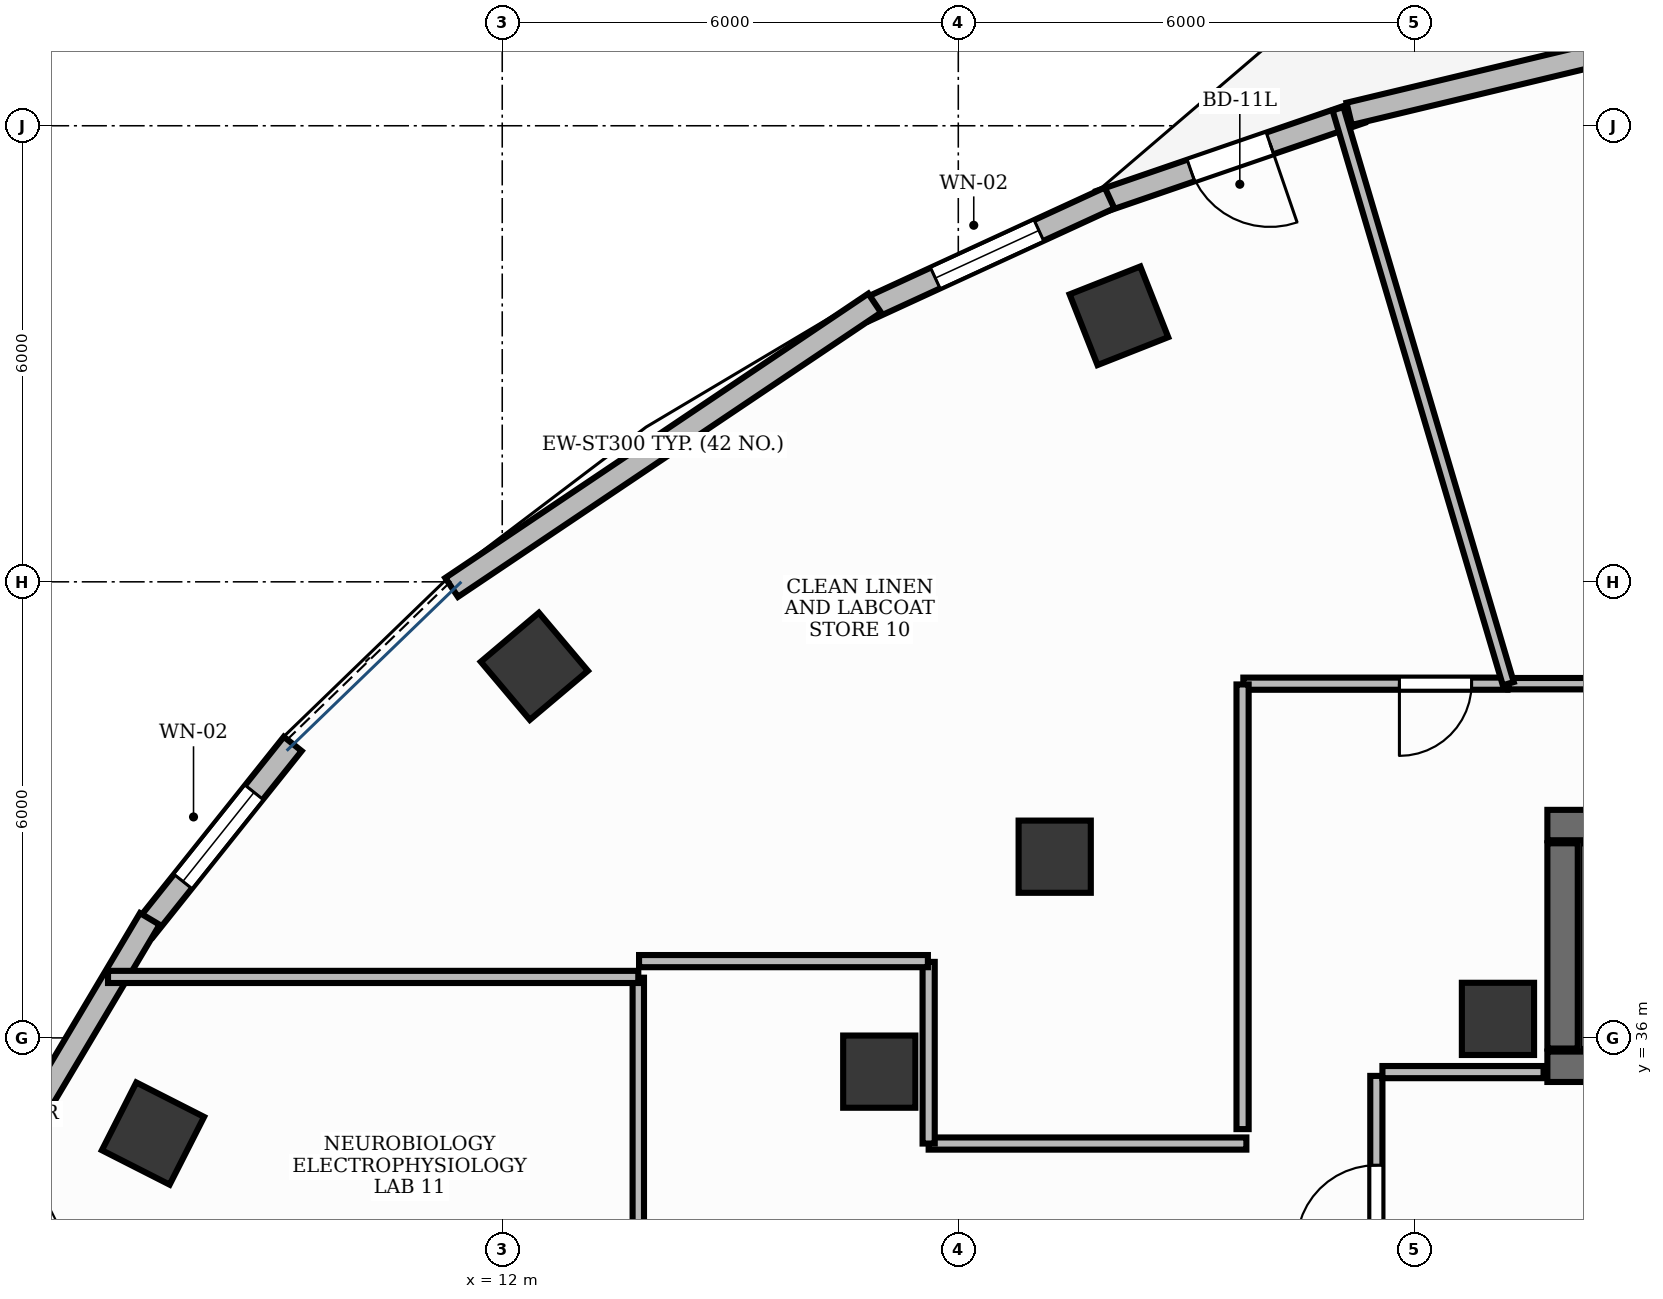
"""IFC4 building model, lengths in metres.
Left out: names, types, materials, properties, quantities, classifications, styles, units other than length and angle.
Written with IfcOpenShell. Run it as: python <this file> out.ifc"""

import sys

from ifc_helpers import new_model, si_unit, direction, frame, frame_2d, origin, origin_2d, place, context, subcontext, project, spatial, rectangle, extrude, element, fill, save


model = new_model("IFC4")
c1 = context("Model", 3, precision=1e-05, world=origin(), true_north=direction((0.0, 1.0)))
c2 = subcontext(c1, "Body", "Model", "MODEL_VIEW")
j1 = project(units=[si_unit("LENGTHUNIT", "METRE"), si_unit("PLANEANGLEUNIT", "RADIAN")], contexts=[c1])
p1 = place(None, origin())
s1 = spatial("IfcSite", under=j1, at=p1, CompositionType="ELEMENT")
p2 = place(p1, origin())
s2 = spatial("IfcBuilding", under=s1, at=p2, CompositionType="ELEMENT")
p3 = place(p2, frame((0.0, 0.0, 222.6)))
s3 = spatial("IfcBuildingStorey", under=s2, at=p3, CompositionType="ELEMENT", Elevation=222.6)
p4 = place(p3, frame((25.75, 38.8, 0.0), z_axis=(0.0, 0.0, 1.0), x_axis=(1.0, 0.0, 0.0)))
e1 = element("IfcWall", 1, at=p4, inside=s3, PredefinedType="SHEAR", context=c2, shape_type="SweptSolid", body=[
    extrude(rectangle(XDim=3.1, YDim=0.4, at=frame_2d((1.55, 0.0))), origin(), (0.0, 0.0, 1.0), 3.9),
])
p5 = place(p3, frame((25.75, 35.62, 0.0), z_axis=(0.0, 0.0, 1.0), x_axis=(1.0, 0.0, 0.0)))
e2 = element("IfcWall", 2, at=p5, inside=s3, PredefinedType="SHEAR", context=c2, shape_type="SweptSolid", body=[
    extrude(rectangle(XDim=3.1, YDim=0.4, at=frame_2d((1.55, 0.0))), origin(), (0.0, 0.0, 1.0), 3.9),
])
p6 = place(p5, frame((0.9, 0.0, 0.0)))
e3 = element("IfcOpeningElement", 3, at=p6, cuts=e2, PredefinedType="OPENING", context=c2, shape_type="SweptSolid", body=[
    extrude(rectangle(XDim=1.3, YDim=2.2, at=frame_2d((0.65, 1.1))), frame((0.0, 0.215, 0.0), z_axis=(0.0, -1.0, 0.0), x_axis=(1.0, 0.0, 0.0)), (0.0, 0.0, 1.0), 0.43),
])
p7 = place(p3, frame((25.95, 35.86, 0.0), z_axis=(0.0, 0.0, 1.0), x_axis=(0.0, 1.0, 0.0)))
e4 = element("IfcWall", 4, at=p7, inside=s3, PredefinedType="SHEAR", context=c2, shape_type="SweptSolid", body=[
    extrude(rectangle(XDim=2.7, YDim=0.4, at=frame_2d((1.35, 0.0))), origin(), (0.0, 0.0, 1.0), 3.9),
])
p8 = place(p3, frame((25.1, 36.25, -0.0), z_axis=(0.0, 0.0, 1.0), x_axis=(1.0, 0.0, 0.0)))
e5 = element("IfcColumn", 5, at=p8, inside=s3, PredefinedType="PILASTER", context=c2, shape_type="SweptSolid", body=[
    extrude(rectangle(XDim=0.95, YDim=0.95, at=origin_2d()), origin(), (0.0, 0.0, 1.0), 3.901),
])
for number, where, z_axis, x_axis in (
    (6, (20.113, 45.5, -0.0), (0.0, 0.0, 1.0), (0.93, 0.367, 0.0)),
    (7, (12.423, 40.889, -0.0), (0.0, 0.0, 1.0), (0.764, 0.645, 0.0)),
):
    element("IfcColumn", number, at=place(p3, frame(where, z_axis=z_axis, x_axis=x_axis)), inside=s3, PredefinedType="COLUMN", context=c2, shape_type="SweptSolid", body=[
        extrude(rectangle(XDim=1.0, YDim=1.0, at=origin_2d()), origin(), (0.0, 0.0, 1.0), 3.901),
    ])
p9 = place(p3, frame((19.268, 38.384, -0.0), z_axis=(0.0, 0.0, 1.0), x_axis=(1.0, 0.0, 0.0)))
e8 = element("IfcColumn", 8, at=p9, inside=s3, PredefinedType="COLUMN", context=c2, shape_type="SweptSolid", body=[
    extrude(rectangle(XDim=0.95, YDim=0.95, at=origin_2d()), origin(), (0.0, 0.0, 1.0), 3.901),
])
p10 = place(p3, frame((7.405, 34.741, -0.0), z_axis=(0.0, 0.0, 1.0), x_axis=(0.453057191132, 0.891481453292, 0.0)))
e9 = element("IfcColumn", 9, at=p10, inside=s3, PredefinedType="COLUMN", context=c2, shape_type="SweptSolid", body=[
    extrude(rectangle(XDim=1.0, YDim=1.0, at=origin_2d()), origin(), (0.0, 0.0, 1.0), 3.901),
])
p11 = place(p3, frame((16.96, 35.556, -0.0), z_axis=(0.0, 0.0, 1.0), x_axis=(1.0, 0.0, 0.0)))
e10 = element("IfcColumn", 10, at=p11, inside=s3, PredefinedType="COLUMN", context=c2, shape_type="SweptSolid", body=[
    extrude(rectangle(XDim=0.95, YDim=0.95, at=origin_2d()), origin(), (0.0, 0.0, 1.0), 3.901),
])
p12 = place(p3, frame((23.296, 48.18, 0.0), z_axis=(0.0, 0.0, 1.0), x_axis=(-0.945702753898, -0.325032769531, 0.0)))
e11 = element("IfcWall", 11, at=p12, inside=s3, PredefinedType="STANDARD", context=c2, shape_type="SweptSolid", body=[
    extrude(rectangle(XDim=3.629, YDim=0.3, at=frame_2d((1.815, 0.0))), origin(), (0.0, 0.0, 1.0), 3.9),
])
p13 = place(p12, frame((1.265, 0.0, 0.0)))
e12 = element("IfcOpeningElement", 12, at=p13, cuts=e11, PredefinedType="OPENING", context=c2, shape_type="SweptSolid", body=[
    extrude(rectangle(XDim=1.1, YDim=2.15, at=frame_2d((0.55, 1.075))), frame((0.0, 0.165, 0.0), z_axis=(0.0, -1.0, 0.0), x_axis=(1.0, 0.0, 0.0)), (0.0, 0.0, 1.0), 0.33),
])
p14 = place(p3, frame((19.99, 47.051, 0.0), z_axis=(0.0, 0.0, 1.0), x_axis=(-0.908478431596, -0.41793174003, 0.0)))
e13 = element("IfcWall", 13, at=p14, inside=s3, PredefinedType="STANDARD", context=c2, shape_type="SweptSolid", body=[
    extrude(rectangle(XDim=3.547, YDim=0.3, at=frame_2d((1.773, 0.0))), origin(), (0.0, 0.0, 1.0), 3.47),
])
p15 = place(p14, frame((1.023, 0.0, 0.95)))
e14 = element("IfcOpeningElement", 14, at=p15, cuts=e13, PredefinedType="OPENING", context=c2, shape_type="SweptSolid", body=[
    extrude(rectangle(XDim=1.5, YDim=1.8, at=frame_2d((0.75, 0.9))), frame((0.0, 0.165, 0.0), z_axis=(0.0, -1.0, 0.0), x_axis=(1.0, 0.0, 0.0)), (0.0, 0.0, 1.0), 0.33),
])
p16 = place(p3, frame((9.244, 39.868, 0.0), z_axis=(0.0, 0.0, 1.0), x_axis=(-0.624095877763, -0.781347768512, 0.0)))
e15 = element("IfcWall", 15, at=p16, inside=s3, PredefinedType="STANDARD", context=c2, shape_type="SweptSolid", body=[
    extrude(rectangle(XDim=3.132, YDim=0.3, at=frame_2d((1.566, 0.0))), origin(), (0.0, 0.0, 1.0), 3.9),
])
p17 = place(p16, frame((0.816, 0.0, 0.95)))
e16 = element("IfcOpeningElement", 16, at=p17, cuts=e15, PredefinedType="OPENING", context=c2, shape_type="SweptSolid", body=[
    extrude(rectangle(XDim=1.5, YDim=1.8, at=frame_2d((0.75, 0.9))), frame((0.0, 0.165, 0.0), z_axis=(0.0, -1.0, 0.0), x_axis=(1.0, 0.0, 0.0)), (0.0, 0.0, 1.0), 0.33),
])
p18 = place(p3, frame((26.775, 49.027, 0.0), z_axis=(0.0, 0.0, 1.0), x_axis=(-0.972475629939, -0.233004611918, 0.0)))
e17 = element("IfcWall", 17, at=p18, inside=s3, PredefinedType="STANDARD", context=c2, shape_type="SweptSolid", body=[
    extrude(rectangle(XDim=3.735, YDim=0.3, at=frame_2d((1.868, 0.0))), origin(), (0.0, 0.0, 1.0), 3.9),
])
p19 = place(p3, frame((16.9, 45.667, 0.0), z_axis=(0.0, 0.0, 1.0), x_axis=(-0.829994558021, -0.557771488743, 0.0)))
e18 = element("IfcWall", 18, at=p19, inside=s3, PredefinedType="STANDARD", context=c2, shape_type="SweptSolid", body=[
    extrude(rectangle(XDim=6.706, YDim=0.3, at=frame_2d((3.353, 0.0))), origin(), (0.0, 0.0, 1.0), 3.47),
])
p20 = place(p3, frame((7.363, 37.565, 0.0), z_axis=(0.0, 0.0, 1.0), x_axis=(-0.511305212285, -0.85939919705, 0.0)))
e19 = element("IfcWall", 19, at=p20, inside=s3, PredefinedType="STANDARD", context=c2, shape_type="SweptSolid", body=[
    extrude(rectangle(XDim=3.075, YDim=0.3, at=frame_2d((1.538, 0.0))), origin(), (0.0, 0.0, 1.0), 3.9),
])
p21 = place(p3, frame((23.5, 32.1, 0.0), z_axis=(0.0, 0.0, 1.0), x_axis=(0.0, 1.0, 0.0)))
e20 = element("IfcWall", 20, at=p21, inside=s3, PredefinedType="PARTITIONING", context=c2, shape_type="SweptSolid", body=[
    extrude(rectangle(XDim=3.4, YDim=0.16, at=frame_2d((1.7, 0.0))), origin(), (0.0, 0.0, 1.0), 2.91),
])
p22 = place(p21, frame((1.175, 0.0, 0.0)))
e21 = element("IfcOpeningElement", 21, at=p22, cuts=e20, PredefinedType="OPENING", context=c2, shape_type="SweptSolid", body=[
    extrude(rectangle(XDim=1.05, YDim=2.15, at=frame_2d((0.525, 1.075))), frame((0.0, 0.095, 0.0), z_axis=(0.0, -1.0, 0.0), x_axis=(1.0, 0.0, 0.0)), (0.0, 0.0, 1.0), 0.19),
])
p23 = place(p3, frame((23.58, 35.55, 0.0), z_axis=(0.0, 0.0, 1.0), x_axis=(1.0, 0.0, 0.0)))
e22 = element("IfcWall", 22, at=p23, inside=s3, PredefinedType="PARTITIONING", context=c2, shape_type="SweptSolid", body=[
    extrude(rectangle(XDim=2.12, YDim=0.16, at=frame_2d((1.06, 0.0))), origin(), (0.0, 0.0, 1.0), 2.91),
])
p24 = place(p3, frame((30.977, 40.66, 0.0), z_axis=(0.0, 0.0, 1.0), x_axis=(-1.0, 0.0, 0.0)))
e23 = element("IfcWall", 23, at=p24, inside=s3, PredefinedType="PARTITIONING", context=c2, shape_type="SweptSolid", body=[
    extrude(rectangle(XDim=5.741, YDim=0.15, at=frame_2d((2.871, 0.0))), origin(), (0.0, 0.0, 1.0), 2.91),
])
p25 = place(p24, frame((0.24, 0.0, 0.0)))
e24 = element("IfcOpeningElement", 24, at=p25, cuts=e23, PredefinedType="OPENING", context=c2, shape_type="SweptSolid", body=[
    extrude(rectangle(XDim=0.95, YDim=2.15, at=frame_2d((0.475, 1.075))), frame((0.0, 0.09, 0.0), z_axis=(0.0, -1.0, 0.0), x_axis=(1.0, 0.0, 0.0)), (0.0, 0.0, 1.0), 0.18),
])
p26 = place(p3, frame((25.226, 40.66, 0.0), z_axis=(0.0, 0.0, 1.0), x_axis=(-1.0, 0.0, 0.0)))
e25 = element("IfcWall", 25, at=p26, inside=s3, PredefinedType="PARTITIONING", context=c2, shape_type="SweptSolid", body=[
    extrude(rectangle(XDim=3.476, YDim=0.16, at=frame_2d((1.738, 0.0))), origin(), (0.0, 0.0, 1.0), 2.91),
])
p27 = place(p26, frame((0.472, 0.0, 0.0)))
e26 = element("IfcOpeningElement", 26, at=p27, cuts=e25, PredefinedType="OPENING", context=c2, shape_type="SweptSolid", body=[
    extrude(rectangle(XDim=0.95, YDim=2.15, at=frame_2d((0.475, 1.075))), frame((0.0, 0.095, 0.0), z_axis=(0.0, -1.0, 0.0), x_axis=(1.0, 0.0, 0.0)), (0.0, 0.0, 1.0), 0.19),
])
p28 = place(p3, frame((13.79, 36.792, 0.0), z_axis=(0.0, 0.0, 1.0), x_axis=(0.0, -1.0, 0.0)))
e27 = element("IfcWall", 27, at=p28, inside=s3, PredefinedType="PARTITIONING", context=c2, shape_type="SweptSolid", body=[
    extrude(rectangle(XDim=4.782, YDim=0.15, at=frame_2d((2.391, 0.0))), origin(), (0.0, 0.0, 1.0), 2.91),
])
p29 = place(p28, frame((3.312, 0.0, 0.0)))
e28 = element("IfcOpeningElement", 28, at=p29, cuts=e27, PredefinedType="OPENING", context=c2, shape_type="SweptSolid", body=[
    extrude(rectangle(XDim=0.95, YDim=2.15, at=frame_2d((0.475, 1.075))), frame((0.0, 0.09, 0.0), z_axis=(0.0, -1.0, 0.0), x_axis=(1.0, 0.0, 0.0)), (0.0, 0.0, 1.0), 0.18),
])
p30 = place(p3, frame((25.236, 40.66, 0.0), z_axis=(0.0, 0.0, 1.0), x_axis=(-0.284007193362, 0.958822149368, 0.0)))
e29 = element("IfcWall", 29, at=p30, inside=s3, PredefinedType="PARTITIONING", context=c2, shape_type="SweptSolid", body=[
    extrude(rectangle(XDim=7.889, YDim=0.15, at=frame_2d((3.944, 0.0))), origin(), (0.0, 0.0, 1.0), 2.91),
])
p31 = place(p3, frame((21.74, 40.65, 0.0), z_axis=(0.0, 0.0, 1.0), x_axis=(0.0, -1.0, 0.0)))
e30 = element("IfcWall", 30, at=p31, inside=s3, PredefinedType="PARTITIONING", context=c2, shape_type="SweptSolid", body=[
    extrude(rectangle(XDim=5.85, YDim=0.16, at=frame_2d((2.925, 0.0))), origin(), (0.0, 0.0, 1.0), 2.91),
])
p32 = place(p3, frame((21.79, 34.61, 0.0), z_axis=(0.0, 0.0, 1.0), x_axis=(-1.0, 0.0, 0.0)))
e31 = element("IfcWall", 31, at=p32, inside=s3, PredefinedType="PARTITIONING", context=c2, shape_type="SweptSolid", body=[
    extrude(rectangle(XDim=4.18, YDim=0.16, at=frame_2d((2.09, 0.0))), origin(), (0.0, 0.0, 1.0), 2.91),
])
p33 = place(p3, frame((17.61, 34.61, 0.0), z_axis=(0.0, 0.0, 1.0), x_axis=(0.0, 1.0, 0.0)))
e32 = element("IfcWall", 32, at=p33, inside=s3, PredefinedType="PARTITIONING", context=c2, shape_type="SweptSolid", body=[
    extrude(rectangle(XDim=2.39, YDim=0.16, at=frame_2d((1.195, 0.0))), origin(), (0.0, 0.0, 1.0), 2.91),
])
p34 = place(p3, frame((17.6, 37.01, 0.0), z_axis=(0.0, 0.0, 1.0), x_axis=(-1.0, 0.0, 0.0)))
e33 = element("IfcWall", 33, at=p34, inside=s3, PredefinedType="PARTITIONING", context=c2, shape_type="SweptSolid", body=[
    extrude(rectangle(XDim=3.8, YDim=0.16, at=frame_2d((1.9, 0.0))), origin(), (0.0, 0.0, 1.0), 2.91),
])
p35 = place(p3, frame((13.79, 36.802, 0.0), z_axis=(0.0, 0.0, 1.0), x_axis=(-1.0, 0.0, 0.0)))
e34 = element("IfcWall", 34, at=p35, inside=s3, PredefinedType="PARTITIONING", context=c2, shape_type="SweptSolid", body=[
    extrude(rectangle(XDim=6.976, YDim=0.16, at=frame_2d((3.488, 0.0))), origin(), (0.0, 0.0, 1.0), 2.91),
])
p36 = place(p13, origin())
e35 = element("IfcDoor", 35, at=p36, inside=s3, OperationType="SINGLE_SWING_LEFT", PredefinedType="DOOR", context=c2, shape_type="SweptSolid", body=[
    extrude(rectangle(XDim=1.1, YDim=2.15, at=frame_2d((0.55, 1.075))), frame((0.0, 0.025, 0.0), z_axis=(0.0, -1.0, 0.0), x_axis=(1.0, 0.0, 0.0)), (0.0, 0.0, 1.0), 0.05),
])
fill(e12, e35)
p37 = place(p15, origin())
e36 = element("IfcWindow", 36, at=p37, inside=s3, PartitioningType="DOUBLE_PANEL_VERTICAL", PredefinedType="WINDOW", context=c2, shape_type="SweptSolid", body=[
    extrude(rectangle(XDim=1.5, YDim=1.8, at=frame_2d((0.75, 0.9))), frame((0.0, 0.03, 0.0), z_axis=(0.0, -1.0, 0.0), x_axis=(1.0, 0.0, 0.0)), (0.0, 0.0, 1.0), 0.06),
])
fill(e14, e36)
p38 = place(p17, origin())
e37 = element("IfcWindow", 37, at=p38, inside=s3, PartitioningType="DOUBLE_PANEL_VERTICAL", PredefinedType="WINDOW", context=c2, shape_type="SweptSolid", body=[
    extrude(rectangle(XDim=1.5, YDim=1.8, at=frame_2d((0.75, 0.9))), frame((0.0, 0.03, 0.0), z_axis=(0.0, -1.0, 0.0), x_axis=(1.0, 0.0, 0.0)), (0.0, 0.0, 1.0), 0.06),
])
fill(e16, e37)
p39 = place(p22, origin())
e38 = element("IfcDoor", 38, at=p39, inside=s3, OperationType="SINGLE_SWING_LEFT", PredefinedType="DOOR", context=c2, shape_type="SweptSolid", body=[
    extrude(rectangle(XDim=1.05, YDim=2.15, at=frame_2d((0.525, 1.075))), frame((0.0, 0.025, 0.0), z_axis=(0.0, -1.0, 0.0), x_axis=(1.0, 0.0, 0.0)), (0.0, 0.0, 1.0), 0.05),
])
fill(e21, e38)
p40 = place(p27, origin())
e39 = element("IfcDoor", 39, at=p40, inside=s3, OperationType="SINGLE_SWING_RIGHT", PredefinedType="DOOR", context=c2, shape_type="SweptSolid", body=[
    extrude(rectangle(XDim=0.95, YDim=2.15, at=frame_2d((0.475, 1.075))), frame((0.0, 0.025, 0.0), z_axis=(0.0, -1.0, 0.0), x_axis=(1.0, 0.0, 0.0)), (0.0, 0.0, 1.0), 0.05),
])
fill(e26, e39)
save(model, sys.argv[1])
